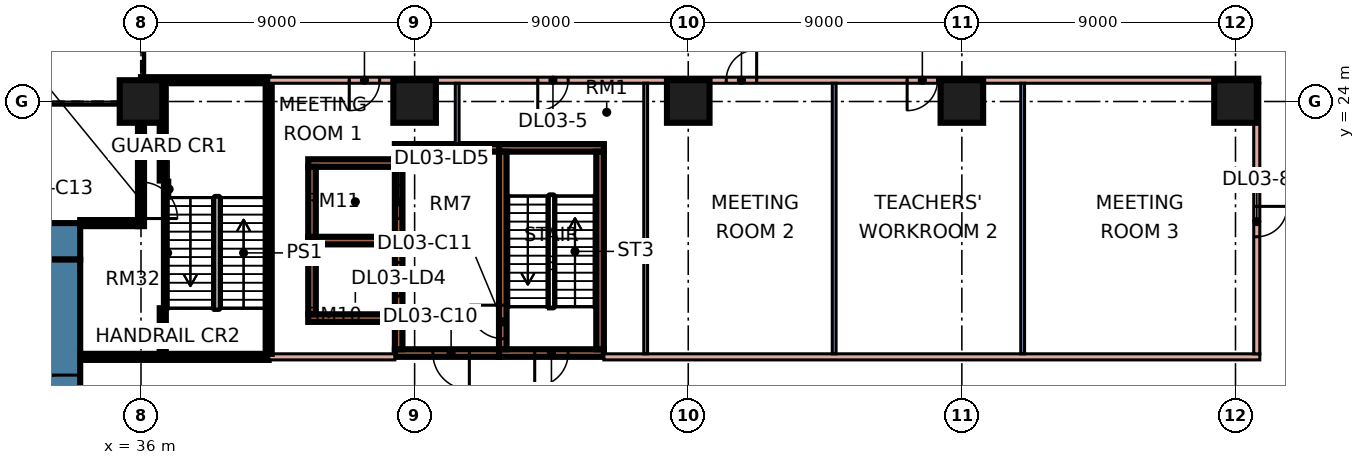
"""IFC4 building model, lengths in metres.
Left out: names, types, materials, properties, quantities, classifications, styles, units other than length and angle.
Written with IfcOpenShell. Run it as: python <this file> out.ifc"""

import sys

from ifc_helpers import new_model, si_unit, direction, frame, frame_2d, origin, origin_2d, place, context, subcontext, project, spatial, rectangle, extrude, element, fill, save


model = new_model("IFC4")
c1 = context("Model", 3, precision=1e-05, world=origin(), true_north=direction((0.0, 1.0)))
c2 = subcontext(c1, "Body", "Model", "MODEL_VIEW")
j1 = project(units=[si_unit("LENGTHUNIT", "METRE"), si_unit("PLANEANGLEUNIT", "RADIAN")], contexts=[c1])
p1 = place(None, origin())
s1 = spatial("IfcSite", under=j1, at=p1, CompositionType="ELEMENT")
p2 = place(p1, origin())
s2 = spatial("IfcBuilding", under=s1, at=p2, CompositionType="ELEMENT")
p3 = place(p2, frame((0.0, 0.0, 16.8)))
s3 = spatial("IfcBuildingStorey", under=s2, at=p3, CompositionType="ELEMENT", Elevation=16.8)
for number, where, z_axis, x_axis in (
    (1, (36.0, 24.0, 0.0), (0.0, 0.0, 1.0), (1.0, 0.0, 0.0)),
    (2, (45.0, 24.0, 0.0), (0.0, 0.0, 1.0), (1.0, 0.0, 0.0)),
    (3, (54.0, 24.0, 0.0), (0.0, 0.0, 1.0), (1.0, 0.0, 0.0)),
    (4, (63.0, 24.0, 0.0), (0.0, 0.0, 1.0), (1.0, 0.0, 0.0)),
    (5, (72.0, 24.0, 0.0), (0.0, 0.0, 1.0), (1.0, 0.0, 0.0)),
):
    element("IfcColumn", number, at=place(p3, frame(where, z_axis=z_axis, x_axis=x_axis)), inside=s3, PredefinedType="COLUMN", context=c2, shape_type="SweptSolid", body=[
        extrude(rectangle(XDim=1.4, YDim=1.4, at=origin_2d()), origin(), (0.0, 0.0, 1.0), 4.8),
    ])
p4 = place(p3, frame((9.0, 19.4, 0.0), z_axis=(0.0, 0.0, 1.0), x_axis=(1.0, 0.0, 0.0)))
e6 = element("IfcWall", 6, at=p4, inside=s3, PredefinedType="SHEAR", context=c2, shape_type="SweptSolid", body=[
    extrude(rectangle(XDim=25.0, YDim=1.2, at=frame_2d((12.5, 0.0))), origin(), (0.0, 0.0, 1.0), 4.8),
])
p5 = place(p4, frame((19.1, 0.0, 0.0)))
e7 = element("IfcOpeningElement", 7, at=p5, cuts=e6, PredefinedType="OPENING", context=c2, shape_type="SweptSolid", body=[
    extrude(rectangle(XDim=1.8, YDim=2.4, at=frame_2d((0.9, 1.2))), frame((0.0, 0.61, 0.0), z_axis=(0.0, -1.0, 0.0), x_axis=(1.0, 0.0, 0.0)), (0.0, 0.0, 1.0), 1.22),
])
p6 = place(p3, frame((33.4, 8.2, 0.0), z_axis=(0.0, 0.0, 1.0), x_axis=(0.0, 1.0, 0.0)))
e8 = element("IfcWall", 8, at=p6, inside=s3, PredefinedType="SHEAR", context=c2, shape_type="SweptSolid", body=[
    extrude(rectangle(XDim=10.6, YDim=1.2, at=frame_2d((5.3, 0.0))), origin(), (0.0, 0.0, 1.0), 4.8),
])
p7 = place(p6, frame((5.0, 0.0, 0.0)))
e9 = element("IfcOpeningElement", 9, at=p7, cuts=e8, PredefinedType="OPENING", context=c2, shape_type="SweptSolid", body=[
    extrude(rectangle(XDim=1.8, YDim=2.4, at=frame_2d((0.9, 1.2))), frame((0.0, 0.61, 0.0), z_axis=(0.0, -1.0, 0.0), x_axis=(1.0, 0.0, 0.0)), (0.0, 0.0, 1.0), 1.22),
])
p8 = place(p3, frame((47.775, 15.725, 0.0), z_axis=(0.0, 0.0, 1.0), x_axis=(1.0, 0.0, 0.0)))
e10 = element("IfcWall", 10, at=p8, inside=s3, PredefinedType="SHEAR", context=c2, shape_type="SweptSolid", body=[
    extrude(rectangle(XDim=3.45, YDim=0.25, at=frame_2d((1.725, 0.0))), origin(), (0.0, 0.0, 1.0), 4.8),
])
p9 = place(p8, frame((1.175, 0.0, 0.0)))
e11 = element("IfcOpeningElement", 11, at=p9, cuts=e10, PredefinedType="OPENING", context=c2, shape_type="SweptSolid", body=[
    extrude(rectangle(XDim=1.1, YDim=2.2, at=frame_2d((0.55, 1.1))), frame((0.0, 0.135, 0.0), z_axis=(0.0, -1.0, 0.0), x_axis=(1.0, 0.0, 0.0)), (0.0, 0.0, 1.0), 0.27),
])
p10 = place(p3, frame((47.775, 22.475, 0.0), z_axis=(0.0, 0.0, 1.0), x_axis=(1.0, 0.0, 0.0)))
e12 = element("IfcWall", 12, at=p10, inside=s3, PredefinedType="SHEAR", context=c2, shape_type="SweptSolid", body=[
    extrude(rectangle(XDim=3.45, YDim=0.25, at=frame_2d((1.725, 0.0))), origin(), (0.0, 0.0, 1.0), 4.8),
])
p11 = place(p3, frame((47.9, 15.85, 0.0), z_axis=(0.0, 0.0, 1.0), x_axis=(0.0, 1.0, 0.0)))
e13 = element("IfcWall", 13, at=p11, inside=s3, PredefinedType="SHEAR", context=c2, shape_type="SweptSolid", body=[
    extrude(rectangle(XDim=6.5, YDim=0.25, at=frame_2d((3.25, 0.0))), origin(), (0.0, 0.0, 1.0), 4.8),
])
p12 = place(p11, frame((0.35, 0.0, 0.0)))
e14 = element("IfcOpeningElement", 14, at=p12, cuts=e13, PredefinedType="OPENING", context=c2, shape_type="SweptSolid", body=[
    extrude(rectangle(XDim=1.1, YDim=2.2, at=frame_2d((0.55, 1.1))), frame((0.0, 0.135, 0.0), z_axis=(0.0, -1.0, 0.0), x_axis=(1.0, 0.0, 0.0)), (0.0, 0.0, 1.0), 0.27),
])
p13 = place(p3, frame((51.1, 15.85, 0.0), z_axis=(0.0, 0.0, 1.0), x_axis=(0.0, 1.0, 0.0)))
e15 = element("IfcWall", 15, at=p13, inside=s3, PredefinedType="SHEAR", context=c2, shape_type="SweptSolid", body=[
    extrude(rectangle(XDim=6.5, YDim=0.25, at=frame_2d((3.25, 0.0))), origin(), (0.0, 0.0, 1.0), 4.8),
])
p14 = place(p3, frame((44.35, 15.725, 0.0), z_axis=(0.0, 0.0, 1.0), x_axis=(1.0, 0.0, 0.0)))
e16 = element("IfcWall", 16, at=p14, inside=s3, PredefinedType="SHEAR", context=c2, shape_type="SweptSolid", body=[
    extrude(rectangle(XDim=3.425, YDim=0.25, at=frame_2d((1.712, 0.0))), origin(), (0.0, 0.0, 1.0), 4.8),
])
p15 = place(p14, frame((1.25, 0.0, 0.0)))
e17 = element("IfcOpeningElement", 17, at=p15, cuts=e16, PredefinedType="OPENING", context=c2, shape_type="SweptSolid", body=[
    extrude(rectangle(XDim=1.2, YDim=2.2, at=frame_2d((0.6, 1.1))), frame((0.0, 0.135, 0.0), z_axis=(0.0, -1.0, 0.0), x_axis=(1.0, 0.0, 0.0)), (0.0, 0.0, 1.0), 0.27),
])
p16 = place(p3, frame((44.35, 22.475, 0.0), z_axis=(0.0, 0.0, 1.0), x_axis=(1.0, 0.0, 0.0)))
e18 = element("IfcWall", 18, at=p16, inside=s3, PredefinedType="SHEAR", context=c2, shape_type="SweptSolid", body=[
    extrude(rectangle(XDim=3.425, YDim=0.25, at=frame_2d((1.712, 0.0))), origin(), (0.0, 0.0, 1.0), 4.8),
])
p17 = place(p3, frame((44.475, 15.85, 0.0), z_axis=(0.0, 0.0, 1.0), x_axis=(0.0, 1.0, 0.0)))
e19 = element("IfcWall", 19, at=p17, inside=s3, PredefinedType="SHEAR", context=c2, shape_type="SweptSolid", body=[
    extrude(rectangle(XDim=6.5, YDim=0.25, at=frame_2d((3.25, 0.0))), origin(), (0.0, 0.0, 1.0), 4.8),
])
p18 = place(p17, frame((1.75, 0.0, 0.0)))
e20 = element("IfcOpeningElement", 20, at=p18, cuts=e19, PredefinedType="OPENING", context=c2, shape_type="SweptSolid", body=[
    extrude(rectangle(XDim=1.1, YDim=2.2, at=frame_2d((0.55, 1.1))), frame((0.0, 0.135, 0.0), z_axis=(0.0, -1.0, 0.0), x_axis=(1.0, 0.0, 0.0)), (0.0, 0.0, 1.0), 0.27),
])
p19 = place(p17, frame((4.3, 0.0, 0.0)))
e21 = element("IfcOpeningElement", 21, at=p19, cuts=e19, PredefinedType="OPENING", context=c2, shape_type="SweptSolid", body=[
    extrude(rectangle(XDim=1.1, YDim=2.2, at=frame_2d((0.55, 1.1))), frame((0.0, 0.135, 0.0), z_axis=(0.0, -1.0, 0.0), x_axis=(1.0, 0.0, 0.0)), (0.0, 0.0, 1.0), 0.27),
])
for number, where, z_axis, x_axis in (
    (22, (41.5, 16.875, 0.0), (0.0, 0.0, 1.0), (1.0, 0.0, 0.0)),
    (23, (41.5, 19.425, 0.0), (0.0, 0.0, 1.0), (1.0, 0.0, 0.0)),
    (24, (41.5, 21.975, 0.0), (0.0, 0.0, 1.0), (1.0, 0.0, 0.0)),
):
    element("IfcWall", number, at=place(p3, frame(where, z_axis=z_axis, x_axis=x_axis)), inside=s3, PredefinedType="SHEAR", context=c2, shape_type="SweptSolid", body=[
        extrude(rectangle(XDim=2.85, YDim=0.25, at=frame_2d((1.425, 0.0))), origin(), (0.0, 0.0, 1.0), 4.8),
    ])
for number, where, z_axis, x_axis in (
    (25, (41.625, 17.0, 0.0), (0.0, 0.0, 1.0), (0.0, 1.0, 0.0)),
    (26, (41.625, 19.55, 0.0), (0.0, 0.0, 1.0), (0.0, 1.0, 0.0)),
):
    element("IfcWall", number, at=place(p3, frame(where, z_axis=z_axis, x_axis=x_axis)), inside=s3, PredefinedType="SHEAR", context=c2, shape_type="SweptSolid", body=[
        extrude(rectangle(XDim=2.3, YDim=0.25, at=frame_2d((1.15, 0.0))), origin(), (0.0, 0.0, 1.0), 4.8),
    ])
p20 = place(p3, frame((34.0, 15.6, 0.0), z_axis=(0.0, 0.0, 1.0), x_axis=(1.0, 0.0, 0.0)))
e27 = element("IfcWall", 27, at=p20, inside=s3, PredefinedType="SOLIDWALL", context=c2, shape_type="SweptSolid", body=[
    extrude(rectangle(XDim=6.2, YDim=0.2, at=frame_2d((3.1, 0.0))), origin(), (0.0, 0.0, 1.0), 4.4),
])
p21 = place(p3, frame((34.0, 20.0, 0.0), z_axis=(0.0, 0.0, 1.0), x_axis=(1.0, 0.0, 0.0)))
e28 = element("IfcWall", 28, at=p21, inside=s3, PredefinedType="SOLIDWALL", context=c2, shape_type="SweptSolid", body=[
    extrude(rectangle(XDim=1.9, YDim=0.2, at=frame_2d((0.95, 0.0))), origin(), (0.0, 0.0, 1.0), 4.4),
])
p22 = place(p3, frame((36.0, 19.9, 0.0), z_axis=(0.0, 0.0, 1.0), x_axis=(0.0, 1.0, 0.0)))
e29 = element("IfcWall", 29, at=p22, inside=s3, PredefinedType="SOLIDWALL", context=c2, shape_type="SweptSolid", body=[
    extrude(rectangle(XDim=4.1, YDim=0.2, at=frame_2d((2.05, 0.0))), origin(), (0.0, 0.0, 1.0), 4.4),
])
p23 = place(p22, frame((0.25, 0.0, 0.0)))
e30 = element("IfcOpeningElement", 30, at=p23, cuts=e29, PredefinedType="OPENING", context=c2, shape_type="SweptSolid", body=[
    extrude(rectangle(XDim=1.2, YDim=2.1, at=frame_2d((0.6, 1.05))), frame((0.0, 0.11, 0.0), z_axis=(0.0, -1.0, 0.0), x_axis=(1.0, 0.0, 0.0)), (0.0, 0.0, 1.0), 0.22),
])
p24 = place(p3, frame((36.0, 24.7, 0.0), z_axis=(0.0, 0.0, 1.0), x_axis=(1.0, 0.0, 0.0)))
e31 = element("IfcWall", 31, at=p24, inside=s3, PredefinedType="SOLIDWALL", context=c2, shape_type="SweptSolid", body=[
    extrude(rectangle(XDim=4.2, YDim=0.2, at=frame_2d((2.1, 0.0))), origin(), (0.0, 0.0, 1.0), 4.4),
])
p25 = place(p3, frame((40.2, 15.6, 0.0), z_axis=(0.0, 0.0, 1.0), x_axis=(1.0, 0.0, 0.0)))
e32 = element("IfcWall", 32, at=p25, inside=s3, PredefinedType="PARTITIONING", context=c2, shape_type="SweptSolid", body=[
    extrude(rectangle(XDim=4.15, YDim=0.2, at=frame_2d((2.075, 0.0))), origin(), (0.0, 0.0, 1.0), 4.4),
])
p26 = place(p3, frame((40.2, 15.7, 0.0), z_axis=(0.0, 0.0, 1.0), x_axis=(0.0, 1.0, 0.0)))
e33 = element("IfcWall", 33, at=p26, inside=s3, PredefinedType="SOLIDWALL", context=c2, shape_type="SweptSolid", body=[
    extrude(rectangle(XDim=8.9, YDim=0.2, at=frame_2d((4.45, 0.0))), origin(), (0.0, 0.0, 1.0), 4.4),
])
p27 = place(p3, frame((40.2, 24.7, 0.0), z_axis=(0.0, 0.0, 1.0), x_axis=(1.0, 0.0, 0.0)))
e34 = element("IfcWall", 34, at=p27, inside=s3, PredefinedType="PARTITIONING", context=c2, shape_type="SweptSolid", body=[
    extrude(rectangle(XDim=32.6, YDim=0.2, at=frame_2d((16.3, 0.0))), origin(), (0.0, 0.0, 1.0), 4.4),
])
p28 = place(p27, frame((2.65, 0.0, 0.0)))
e35 = element("IfcOpeningElement", 35, at=p28, cuts=e34, PredefinedType="OPENING", context=c2, shape_type="SweptSolid", body=[
    extrude(rectangle(XDim=1.0, YDim=2.1, at=frame_2d((0.5, 1.05))), frame((0.0, 0.11, 0.0), z_axis=(0.0, -1.0, 0.0), x_axis=(1.0, 0.0, 0.0)), (0.0, 0.0, 1.0), 0.22),
])
p29 = place(p27, frame((8.85, 0.0, 0.0)))
e36 = element("IfcOpeningElement", 36, at=p29, cuts=e34, PredefinedType="OPENING", context=c2, shape_type="SweptSolid", body=[
    extrude(rectangle(XDim=1.0, YDim=2.1, at=frame_2d((0.5, 1.05))), frame((0.0, 0.11, 0.0), z_axis=(0.0, -1.0, 0.0), x_axis=(1.0, 0.0, 0.0)), (0.0, 0.0, 1.0), 0.22),
])
p30 = place(p27, frame((15.05, 0.0, 0.0)))
e37 = element("IfcOpeningElement", 37, at=p30, cuts=e34, PredefinedType="OPENING", context=c2, shape_type="SweptSolid", body=[
    extrude(rectangle(XDim=1.0, YDim=2.1, at=frame_2d((0.5, 1.05))), frame((0.0, 0.11, 0.0), z_axis=(0.0, -1.0, 0.0), x_axis=(1.0, 0.0, 0.0)), (0.0, 0.0, 1.0), 0.22),
])
p31 = place(p27, frame((21.0, 0.0, 0.0)))
e38 = element("IfcOpeningElement", 38, at=p31, cuts=e34, PredefinedType="OPENING", context=c2, shape_type="SweptSolid", body=[
    extrude(rectangle(XDim=1.0, YDim=2.1, at=frame_2d((0.5, 1.05))), frame((0.0, 0.11, 0.0), z_axis=(0.0, -1.0, 0.0), x_axis=(1.0, 0.0, 0.0)), (0.0, 0.0, 1.0), 0.22),
])
p32 = place(p3, frame((46.4, 22.6, 0.0), z_axis=(0.0, 0.0, 1.0), x_axis=(0.0, 1.0, 0.0)))
e39 = element("IfcWall", 39, at=p32, inside=s3, PredefinedType="PARTITIONING", context=c2, shape_type="SweptSolid", body=[
    extrude(rectangle(XDim=2.0, YDim=0.125, at=frame_2d((1.0, 0.0))), origin(), (0.0, 0.0, 1.0), 4.4),
])
p33 = place(p3, frame((51.225, 15.6, 0.0), z_axis=(0.0, 0.0, 1.0), x_axis=(1.0, 0.0, 0.0)))
e40 = element("IfcWall", 40, at=p33, inside=s3, PredefinedType="PARTITIONING", context=c2, shape_type="SweptSolid", body=[
    extrude(rectangle(XDim=21.575, YDim=0.2, at=frame_2d((10.788, 0.0))), origin(), (0.0, 0.0, 1.0), 4.4),
])
for number, where, z_axis, x_axis in (
    (41, (52.6, 15.7, 0.0), (0.0, 0.0, 1.0), (0.0, 1.0, 0.0)),
    (42, (58.8, 15.7, 0.0), (0.0, 0.0, 1.0), (0.0, 1.0, 0.0)),
    (43, (65.0, 15.7, 0.0), (0.0, 0.0, 1.0), (0.0, 1.0, 0.0)),
):
    element("IfcWall", number, at=place(p3, frame(where, z_axis=z_axis, x_axis=x_axis)), inside=s3, PredefinedType="PARTITIONING", context=c2, shape_type="SweptSolid", body=[
        extrude(rectangle(XDim=8.9, YDim=0.125, at=frame_2d((4.45, 0.0))), origin(), (0.0, 0.0, 1.0), 4.4),
    ])
p34 = place(p3, frame((72.7, 15.7, 0.0), z_axis=(0.0, 0.0, 1.0), x_axis=(0.0, 1.0, 0.0)))
e44 = element("IfcWall", 44, at=p34, inside=s3, PredefinedType="PARTITIONING", context=c2, shape_type="SweptSolid", body=[
    extrude(rectangle(XDim=8.9, YDim=0.2, at=frame_2d((4.45, 0.0))), origin(), (0.0, 0.0, 1.0), 4.4),
])
p35 = place(p34, frame((3.85, 0.0, 0.0)))
e45 = element("IfcOpeningElement", 45, at=p35, cuts=e44, PredefinedType="OPENING", context=c2, shape_type="SweptSolid", body=[
    extrude(rectangle(XDim=1.0, YDim=2.1, at=frame_2d((0.5, 1.05))), frame((0.0, 0.11, 0.0), z_axis=(0.0, -1.0, 0.0), x_axis=(1.0, 0.0, 0.0)), (0.0, 0.0, 1.0), 0.22),
])
p36 = place(p3, frame((36.715, 21.4, 0.0), z_axis=(0.0, 0.0, 1.0), x_axis=(0.0, 1.0, 0.0)))
e46 = element("IfcWall", 46, at=p36, inside=s3, PredefinedType="SOLIDWALL", context=c2, shape_type="SweptSolid", body=[
    extrude(rectangle(XDim=3.2, YDim=0.2, at=frame_2d((1.6, 0.0))), origin(), (0.0, 0.0, 1.0), 4.4),
])
p37 = place(p3, frame((36.715, 15.7, 0.0), z_axis=(0.0, 0.0, 1.0), x_axis=(0.0, 1.0, 0.0)))
e47 = element("IfcWall", 47, at=p37, inside=s3, PredefinedType="SOLIDWALL", context=c2, shape_type="SweptSolid", body=[
    extrude(rectangle(XDim=1.5, YDim=0.2, at=frame_2d((0.75, 0.0))), origin(), (0.0, 0.0, 1.0), 4.4),
])
p38 = place(p7, origin())
e48 = element("IfcDoor", 48, at=p38, inside=s3, OperationType="DOUBLE_DOOR_SINGLE_SWING", PredefinedType="DOOR", context=c2, shape_type="SweptSolid", body=[
    extrude(rectangle(XDim=1.8, YDim=2.4, at=frame_2d((0.9, 1.2))), frame((0.0, 0.025, 0.0), z_axis=(0.0, -1.0, 0.0), x_axis=(1.0, 0.0, 0.0)), (0.0, 0.0, 1.0), 0.05),
])
fill(e9, e48)
p39 = place(p9, frame((1.1, 0.0, 0.0), z_axis=(0.0, 0.0, 1.0), x_axis=(-1.0, 0.0, 0.0)))
e49 = element("IfcDoor", 49, at=p39, inside=s3, OperationType="SINGLE_SWING_LEFT", PredefinedType="DOOR", context=c2, shape_type="SweptSolid", body=[
    extrude(rectangle(XDim=1.1, YDim=2.2, at=frame_2d((0.55, 1.1))), frame((0.0, 0.025, 0.0), z_axis=(0.0, -1.0, 0.0), x_axis=(1.0, 0.0, 0.0)), (0.0, 0.0, 1.0), 0.05),
])
fill(e11, e49)
p40 = place(p15, origin())
e50 = element("IfcDoor", 50, at=p40, inside=s3, OperationType="SINGLE_SWING_RIGHT", PredefinedType="DOOR", context=c2, shape_type="SweptSolid", body=[
    extrude(rectangle(XDim=1.2, YDim=2.2, at=frame_2d((0.6, 1.1))), frame((0.0, 0.025, 0.0), z_axis=(0.0, -1.0, 0.0), x_axis=(1.0, 0.0, 0.0)), (0.0, 0.0, 1.0), 0.05),
])
fill(e17, e50)
p41 = place(p12, frame((1.1, 0.0, 0.0), z_axis=(0.0, 0.0, 1.0), x_axis=(-1.0, 0.0, 0.0)))
e51 = element("IfcDoor", 51, at=p41, inside=s3, OperationType="SINGLE_SWING_RIGHT", PredefinedType="DOOR", context=c2, shape_type="SweptSolid", body=[
    extrude(rectangle(XDim=1.1, YDim=2.2, at=frame_2d((0.55, 1.1))), frame((0.0, 0.025, 0.0), z_axis=(0.0, -1.0, 0.0), x_axis=(1.0, 0.0, 0.0)), (0.0, 0.0, 1.0), 0.05),
])
fill(e14, e51)
p42 = place(p18, origin())
e52 = element("IfcDoor", 52, at=p42, inside=s3, OperationType="DOUBLE_DOOR_SLIDING", PredefinedType="DOOR", context=c2, shape_type="SweptSolid", body=[
    extrude(rectangle(XDim=1.1, YDim=2.2, at=frame_2d((0.55, 1.1))), frame((0.0, 0.025, 0.0), z_axis=(0.0, -1.0, 0.0), x_axis=(1.0, 0.0, 0.0)), (0.0, 0.0, 1.0), 0.05),
])
fill(e20, e52)
p43 = place(p19, origin())
e53 = element("IfcDoor", 53, at=p43, inside=s3, OperationType="DOUBLE_DOOR_SLIDING", PredefinedType="DOOR", context=c2, shape_type="SweptSolid", body=[
    extrude(rectangle(XDim=1.1, YDim=2.2, at=frame_2d((0.55, 1.1))), frame((0.0, 0.025, 0.0), z_axis=(0.0, -1.0, 0.0), x_axis=(1.0, 0.0, 0.0)), (0.0, 0.0, 1.0), 0.05),
])
fill(e21, e53)
p44 = place(p28, frame((1.0, 0.0, 0.0), z_axis=(0.0, 0.0, 1.0), x_axis=(-1.0, 0.0, 0.0)))
e54 = element("IfcDoor", 54, at=p44, inside=s3, OperationType="SINGLE_SWING_LEFT", PredefinedType="DOOR", context=c2, shape_type="SweptSolid", body=[
    extrude(rectangle(XDim=1.0, YDim=2.1, at=frame_2d((0.5, 1.05))), frame((0.0, 0.025, 0.0), z_axis=(0.0, -1.0, 0.0), x_axis=(1.0, 0.0, 0.0)), (0.0, 0.0, 1.0), 0.05),
])
fill(e35, e54)
p45 = place(p29, frame((1.0, 0.0, 0.0), z_axis=(0.0, 0.0, 1.0), x_axis=(-1.0, 0.0, 0.0)))
e55 = element("IfcDoor", 55, at=p45, inside=s3, OperationType="SINGLE_SWING_LEFT", PredefinedType="DOOR", context=c2, shape_type="SweptSolid", body=[
    extrude(rectangle(XDim=1.0, YDim=2.1, at=frame_2d((0.5, 1.05))), frame((0.0, 0.025, 0.0), z_axis=(0.0, -1.0, 0.0), x_axis=(1.0, 0.0, 0.0)), (0.0, 0.0, 1.0), 0.05),
])
fill(e36, e55)
p46 = place(p30, frame((1.0, 0.0, 0.0), z_axis=(0.0, 0.0, 1.0), x_axis=(-1.0, 0.0, 0.0)))
e56 = element("IfcDoor", 56, at=p46, inside=s3, OperationType="SINGLE_SWING_RIGHT", PredefinedType="DOOR", context=c2, shape_type="SweptSolid", body=[
    extrude(rectangle(XDim=1.0, YDim=2.1, at=frame_2d((0.5, 1.05))), frame((0.0, 0.025, 0.0), z_axis=(0.0, -1.0, 0.0), x_axis=(1.0, 0.0, 0.0)), (0.0, 0.0, 1.0), 0.05),
])
fill(e37, e56)
p47 = place(p31, frame((1.0, 0.0, 0.0), z_axis=(0.0, 0.0, 1.0), x_axis=(-1.0, 0.0, 0.0)))
e57 = element("IfcDoor", 57, at=p47, inside=s3, OperationType="SINGLE_SWING_LEFT", PredefinedType="DOOR", context=c2, shape_type="SweptSolid", body=[
    extrude(rectangle(XDim=1.0, YDim=2.1, at=frame_2d((0.5, 1.05))), frame((0.0, 0.025, 0.0), z_axis=(0.0, -1.0, 0.0), x_axis=(1.0, 0.0, 0.0)), (0.0, 0.0, 1.0), 0.05),
])
fill(e38, e57)
p48 = place(p35, origin())
e58 = element("IfcDoor", 58, at=p48, inside=s3, OperationType="SINGLE_SWING_RIGHT", PredefinedType="DOOR", context=c2, shape_type="SweptSolid", body=[
    extrude(rectangle(XDim=1.0, YDim=2.1, at=frame_2d((0.5, 1.05))), frame((0.0, 0.025, 0.0), z_axis=(0.0, -1.0, 0.0), x_axis=(1.0, 0.0, 0.0)), (0.0, 0.0, 1.0), 0.05),
])
fill(e45, e58)
p49 = place(p23, frame((1.2, 0.0, 0.0), z_axis=(0.0, 0.0, 1.0), x_axis=(-1.0, 0.0, 0.0)))
e59 = element("IfcDoor", 59, at=p49, inside=s3, OperationType="SINGLE_SWING_LEFT", PredefinedType="DOOR", context=c2, shape_type="SweptSolid", body=[
    extrude(rectangle(XDim=1.2, YDim=2.1, at=frame_2d((0.6, 1.05))), frame((0.0, 0.025, 0.0), z_axis=(0.0, -1.0, 0.0), x_axis=(1.0, 0.0, 0.0)), (0.0, 0.0, 1.0), 0.05),
])
fill(e30, e59)
save(model, sys.argv[1])
